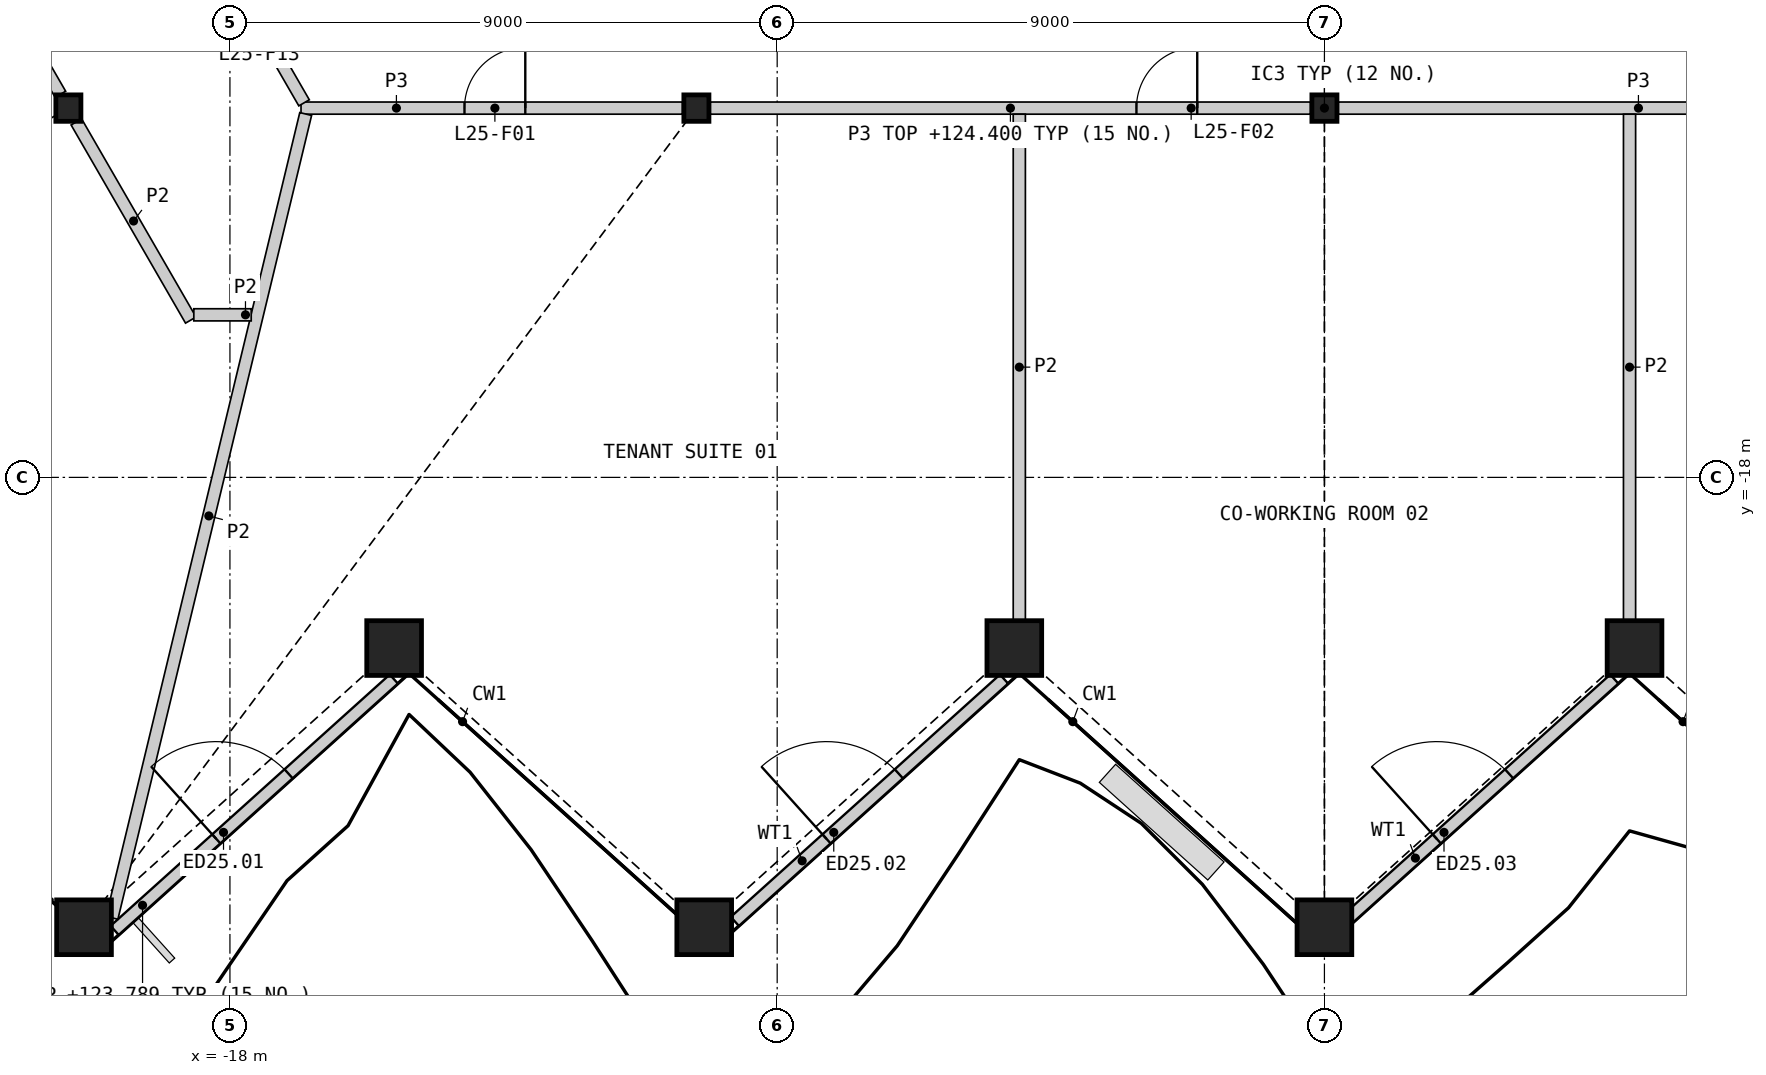
"""IFC4 building model, lengths in metres.
Left out: names, types, materials, properties, quantities, classifications, styles, units other than length and angle.
Written with IfcOpenShell. Run it as: python <this file> out.ifc"""

import sys

from ifc_helpers import new_model, si_unit, direction, frame, frame_2d, origin, origin_2d, place, context, subcontext, project, spatial, rectangle, hollow_rectangle, i_section, extrude, element, fill, save


model = new_model("IFC4")
c1 = context("Model", 3, precision=1e-05, world=origin(), true_north=direction((0.0, 1.0)))
c2 = subcontext(c1, "Body", "Model", "MODEL_VIEW")
j1 = project(units=[si_unit("LENGTHUNIT", "METRE"), si_unit("PLANEANGLEUNIT", "RADIAN")], contexts=[c1])
p1 = place(None, origin())
s1 = spatial("IfcSite", under=j1, at=p1, CompositionType="ELEMENT")
p2 = place(p1, origin())
s2 = spatial("IfcBuilding", under=s1, at=p2, CompositionType="ELEMENT")
p3 = place(p2, frame((0.0, 0.0, 120.6)))
s3 = spatial("IfcBuildingStorey", under=s2, at=p3, CompositionType="ELEMENT", Elevation=120.6)
for number, where, z_axis, x_axis in (
    (1, (-20.4, -25.399, 0.0), (0.0, 0.0, 1.0), (1.0, 0.0, 0.0)),
    (2, (-15.3, -20.807, 0.0), (0.0, 0.0, 1.0), (1.0, 0.0, 0.0)),
    (3, (-10.2, -25.399, 0.0), (0.0, 0.0, 1.0), (1.0, 0.0, 0.0)),
    (4, (-5.1, -20.807, 0.0), (0.0, 0.0, 1.0), (1.0, 0.0, 0.0)),
    (5, (0.0, -25.399, 0.0), (0.0, 0.0, 1.0), (1.0, 0.0, 0.0)),
    (6, (5.1, -20.807, 0.0), (0.0, 0.0, 1.0), (1.0, 0.0, 0.0)),
):
    element("IfcColumn", number, at=place(p3, frame(where, z_axis=z_axis, x_axis=x_axis)), inside=s3, PredefinedType="COLUMN", context=c2, shape_type="SweptSolid", body=[
        extrude(hollow_rectangle(XDim=0.9, YDim=0.9, WallThickness=0.06, at=origin_2d()), origin(), (0.0, 0.0, 1.0), 4.2),
    ])
for number, where, z_axis, x_axis in (
    (7, (-20.657, -11.926, 0.0), (0.0, 0.0, 1.0), (1.0, 0.0, 0.0)),
    (8, (-10.328, -11.926, 0.0), (0.0, 0.0, 1.0), (1.0, 0.0, 0.0)),
    (9, (0.0, -11.926, 0.0), (0.0, 0.0, 1.0), (1.0, 0.0, 0.0)),
):
    element("IfcColumn", number, at=place(p3, frame(where, z_axis=z_axis, x_axis=x_axis)), inside=s3, PredefinedType="COLUMN", context=c2, shape_type="SweptSolid", body=[
        extrude(i_section(OverallWidth=0.412, OverallDepth=0.435, WebThickness=0.036, FlangeThickness=0.057, at=origin_2d()), origin(), (0.0, 0.0, 1.0), 4.2),
    ])
p4 = place(p3, frame((-19.896, -25.451, 0.0), z_axis=(0.0, 0.0, 1.0), x_axis=(0.743162487272, 0.669110990428, 0.0)))
e10 = element("IfcWall", 10, at=p4, inside=s3, PredefinedType="SOLIDWALL", context=c2, shape_type="SweptSolid", body=[
    extrude(rectangle(XDim=6.178, YDim=0.2, at=frame_2d((3.089, 0.0))), origin(), (0.0, 0.0, 1.0), 3.189),
])
p5 = place(p4, frame((2.25, 0.0, 0.0)))
e11 = element("IfcOpeningElement", 11, at=p5, cuts=e10, PredefinedType="OPENING", context=c2, shape_type="SweptSolid", body=[
    extrude(rectangle(XDim=1.6, YDim=2.4, at=frame_2d((0.8, 1.2))), frame((0.0, 0.11, 0.0), z_axis=(0.0, -1.0, 0.0), x_axis=(1.0, 0.0, 0.0)), (0.0, 0.0, 1.0), 0.22),
])
p6 = place(p3, frame((-9.696, -25.303, 0.0), z_axis=(0.0, 0.0, 1.0), x_axis=(0.743141307259, 0.669134513716, 0.0)))
e12 = element("IfcWall", 12, at=p6, inside=s3, PredefinedType="SOLIDWALL", context=c2, shape_type="SweptSolid", body=[
    extrude(rectangle(XDim=5.958, YDim=0.2, at=frame_2d((2.979, 0.0))), origin(), (0.0, 0.0, 1.0), 3.189),
])
p7 = place(p6, frame((2.029, 0.0, 0.0)))
e13 = element("IfcOpeningElement", 13, at=p7, cuts=e12, PredefinedType="OPENING", context=c2, shape_type="SweptSolid", body=[
    extrude(rectangle(XDim=1.6, YDim=2.4, at=frame_2d((0.8, 1.2))), frame((0.0, 0.11, 0.0), z_axis=(0.0, -1.0, 0.0), x_axis=(1.0, 0.0, 0.0)), (0.0, 0.0, 1.0), 0.22),
])
p8 = place(p3, frame((0.406, -25.244, 0.0), z_axis=(0.0, 0.0, 1.0), x_axis=(0.743138997535, 0.669137078888, 0.0)))
e14 = element("IfcWall", 14, at=p8, inside=s3, PredefinedType="SOLIDWALL", context=c2, shape_type="SweptSolid", body=[
    extrude(rectangle(XDim=5.869, YDim=0.2, at=frame_2d((2.935, 0.0))), origin(), (0.0, 0.0, 1.0), 3.189),
])
p9 = place(p8, frame((1.94, 0.0, 0.0)))
e15 = element("IfcOpeningElement", 15, at=p9, cuts=e14, PredefinedType="OPENING", context=c2, shape_type="SweptSolid", body=[
    extrude(rectangle(XDim=1.6, YDim=2.4, at=frame_2d((0.8, 1.2))), frame((0.0, 0.11, 0.0), z_axis=(0.0, -1.0, 0.0), x_axis=(1.0, 0.0, 0.0)), (0.0, 0.0, 1.0), 0.22),
])
p10 = place(p3, frame((-10.101, -11.926, 0.0), z_axis=(0.0, 0.0, 1.0), x_axis=(1.0, 0.0, 0.0)))
e16 = element("IfcWall", 16, at=p10, inside=s3, PredefinedType="PARTITIONING", context=c2, shape_type="SweptSolid", body=[
    extrude(rectangle(XDim=9.874, YDim=0.2, at=frame_2d((4.937, 0.0))), origin(), (0.0, 0.0, 1.0), 3.8),
])
p11 = place(p10, frame((7.01, 0.0, 0.0)))
e17 = element("IfcOpeningElement", 17, at=p11, cuts=e16, PredefinedType="OPENING", context=c2, shape_type="SweptSolid", body=[
    extrude(rectangle(XDim=1.0, YDim=2.1, at=frame_2d((0.5, 1.05))), frame((0.0, 0.11, 0.0), z_axis=(0.0, -1.0, 0.0), x_axis=(1.0, 0.0, 0.0)), (0.0, 0.0, 1.0), 0.22),
])
p12 = place(p3, frame((0.227, -11.926, 0.0), z_axis=(0.0, 0.0, 1.0), x_axis=(1.0, 0.0, 0.0)))
e18 = element("IfcWall", 18, at=p12, inside=s3, PredefinedType="PARTITIONING", context=c2, shape_type="SweptSolid", body=[
    extrude(rectangle(XDim=9.874, YDim=0.2, at=frame_2d((4.937, 0.0))), origin(), (0.0, 0.0, 1.0), 3.8),
])
p13 = place(p3, frame((-16.831, -11.926, 0.0), z_axis=(0.0, 0.0, 1.0), x_axis=(1.0, 0.0, 0.0)))
e19 = element("IfcWall", 19, at=p13, inside=s3, PredefinedType="PARTITIONING", context=c2, shape_type="SweptSolid", body=[
    extrude(rectangle(XDim=6.275, YDim=0.2, at=frame_2d((3.137, 0.0))), origin(), (0.0, 0.0, 1.0), 3.8),
])
p14 = place(p13, frame((2.688, 0.0, 0.0)))
e20 = element("IfcOpeningElement", 20, at=p14, cuts=e19, PredefinedType="OPENING", context=c2, shape_type="SweptSolid", body=[
    extrude(rectangle(XDim=1.0, YDim=2.1, at=frame_2d((0.5, 1.05))), frame((0.0, 0.11, 0.0), z_axis=(0.0, -1.0, 0.0), x_axis=(1.0, 0.0, 0.0)), (0.0, 0.0, 1.0), 0.22),
])
p15 = place(p3, frame((-18.644, -8.613, 0.0), z_axis=(0.0, 0.0, 1.0), x_axis=(0.499958791762, -0.866049194065, 0.0)))
e21 = element("IfcWall", 21, at=p15, inside=s3, PredefinedType="PARTITIONING", context=c2, shape_type="SweptSolid", body=[
    extrude(rectangle(XDim=3.726, YDim=0.2, at=frame_2d((1.863, 0.0))), origin(), (0.0, 0.0, 1.0), 3.8),
])
p16 = place(p15, frame((1.388, 0.0, 0.0)))
e22 = element("IfcOpeningElement", 22, at=p16, cuts=e21, PredefinedType="OPENING", context=c2, shape_type="SweptSolid", body=[
    extrude(rectangle(XDim=0.95, YDim=2.1, at=frame_2d((0.475, 1.05))), frame((0.0, 0.11, 0.0), z_axis=(0.0, -1.0, 0.0), x_axis=(1.0, 0.0, 0.0)), (0.0, 0.0, 1.0), 0.22),
])
p17 = place(p3, frame((-19.94, -25.244, 0.0), z_axis=(0.0, 0.0, 1.0), x_axis=(0.234226353532, 0.972182089586, 0.0)))
e23 = element("IfcWall", 23, at=p17, inside=s3, PredefinedType="PARTITIONING", context=c2, shape_type="SweptSolid", body=[
    extrude(rectangle(XDim=13.599, YDim=0.2, at=frame_2d((6.8, 0.0))), origin(), (0.0, 0.0, 1.0), 2.885),
])
for number, where, z_axis, x_axis in (
    (24, (-5.018, -20.347, 0.0), (0.0, 0.0, 1.0), (0.0, 1.0, 0.0)),
    (25, (5.018, -20.347, 0.0), (0.0, 0.0, 1.0), (0.0, 1.0, 0.0)),
):
    element("IfcWall", number, at=place(p3, frame(where, z_axis=z_axis, x_axis=x_axis)), inside=s3, PredefinedType="PARTITIONING", context=c2, shape_type="SweptSolid", body=[
        extrude(rectangle(XDim=8.321, YDim=0.2, at=frame_2d((4.16, 0.0))), origin(), (0.0, 0.0, 1.0), 2.885),
    ])
p18 = place(p3, frame((-20.526, -12.154, 0.0), z_axis=(0.0, 0.0, 1.0), x_axis=(0.500046282919, -0.86599868068, 0.0)))
e26 = element("IfcWall", 26, at=p18, inside=s3, PredefinedType="PARTITIONING", context=c2, shape_type="SweptSolid", body=[
    extrude(rectangle(XDim=3.763, YDim=0.2, at=frame_2d((1.882, 0.0))), origin(), (0.0, 0.0, 1.0), 2.885),
])
p19 = place(p3, frame((-22.67, -8.44, 0.0), z_axis=(0.0, 0.0, 1.0), x_axis=(0.500018191375, -0.866014900734, 0.0)))
e27 = element("IfcWall", 27, at=p19, inside=s3, PredefinedType="PARTITIONING", context=c2, shape_type="SweptSolid", body=[
    extrude(rectangle(XDim=3.763, YDim=0.2, at=frame_2d((1.882, 0.0))), origin(), (0.0, 0.0, 1.0), 2.885),
])
p20 = place(p19, frame((1.658, 0.0, 0.0)))
e28 = element("IfcOpeningElement", 28, at=p20, cuts=e27, PredefinedType="OPENING", context=c2, shape_type="SweptSolid", body=[
    extrude(rectangle(XDim=0.95, YDim=2.1, at=frame_2d((0.475, 1.05))), frame((0.0, 0.11, 0.0), z_axis=(0.0, -1.0, 0.0), x_axis=(1.0, 0.0, 0.0)), (0.0, 0.0, 1.0), 0.22),
])
p21 = place(p3, frame((-18.594, -15.326, 0.0), z_axis=(0.0, 0.0, 1.0), x_axis=(1.0, 0.0, 0.0)))
e29 = element("IfcWall", 29, at=p21, inside=s3, PredefinedType="PARTITIONING", context=c2, shape_type="SweptSolid", body=[
    extrude(rectangle(XDim=0.944, YDim=0.2, at=frame_2d((0.472, 0.0))), origin(), (0.0, 0.0, 1.0), 2.885),
])
p22 = place(p5, origin())
e30 = element("IfcDoor", 30, at=p22, inside=s3, OperationType="DOUBLE_DOOR_SINGLE_SWING", PredefinedType="DOOR", context=c2, shape_type="SweptSolid", body=[
    extrude(rectangle(XDim=1.6, YDim=2.4, at=frame_2d((0.8, 1.2))), frame((0.0, 0.025, 0.0), z_axis=(0.0, -1.0, 0.0), x_axis=(1.0, 0.0, 0.0)), (0.0, 0.0, 1.0), 0.05),
])
fill(e11, e30)
p23 = place(p7, origin())
e31 = element("IfcDoor", 31, at=p23, inside=s3, OperationType="DOUBLE_DOOR_SINGLE_SWING", PredefinedType="DOOR", context=c2, shape_type="SweptSolid", body=[
    extrude(rectangle(XDim=1.6, YDim=2.4, at=frame_2d((0.8, 1.2))), frame((0.0, 0.025, 0.0), z_axis=(0.0, -1.0, 0.0), x_axis=(1.0, 0.0, 0.0)), (0.0, 0.0, 1.0), 0.05),
])
fill(e13, e31)
p24 = place(p9, origin())
e32 = element("IfcDoor", 32, at=p24, inside=s3, OperationType="DOUBLE_DOOR_SINGLE_SWING", PredefinedType="DOOR", context=c2, shape_type="SweptSolid", body=[
    extrude(rectangle(XDim=1.6, YDim=2.4, at=frame_2d((0.8, 1.2))), frame((0.0, 0.025, 0.0), z_axis=(0.0, -1.0, 0.0), x_axis=(1.0, 0.0, 0.0)), (0.0, 0.0, 1.0), 0.05),
])
fill(e15, e32)
p25 = place(p14, origin())
e33 = element("IfcDoor", 33, at=p25, inside=s3, OperationType="SINGLE_SWING_RIGHT", PredefinedType="DOOR", context=c2, shape_type="SweptSolid", body=[
    extrude(rectangle(XDim=1.0, YDim=2.1, at=frame_2d((0.5, 1.05))), frame((0.0, 0.025, 0.0), z_axis=(0.0, -1.0, 0.0), x_axis=(1.0, 0.0, 0.0)), (0.0, 0.0, 1.0), 0.05),
])
fill(e20, e33)
p26 = place(p11, origin())
e34 = element("IfcDoor", 34, at=p26, inside=s3, OperationType="SINGLE_SWING_RIGHT", PredefinedType="DOOR", context=c2, shape_type="SweptSolid", body=[
    extrude(rectangle(XDim=1.0, YDim=2.1, at=frame_2d((0.5, 1.05))), frame((0.0, 0.025, 0.0), z_axis=(0.0, -1.0, 0.0), x_axis=(1.0, 0.0, 0.0)), (0.0, 0.0, 1.0), 0.05),
])
fill(e17, e34)
save(model, sys.argv[1])
